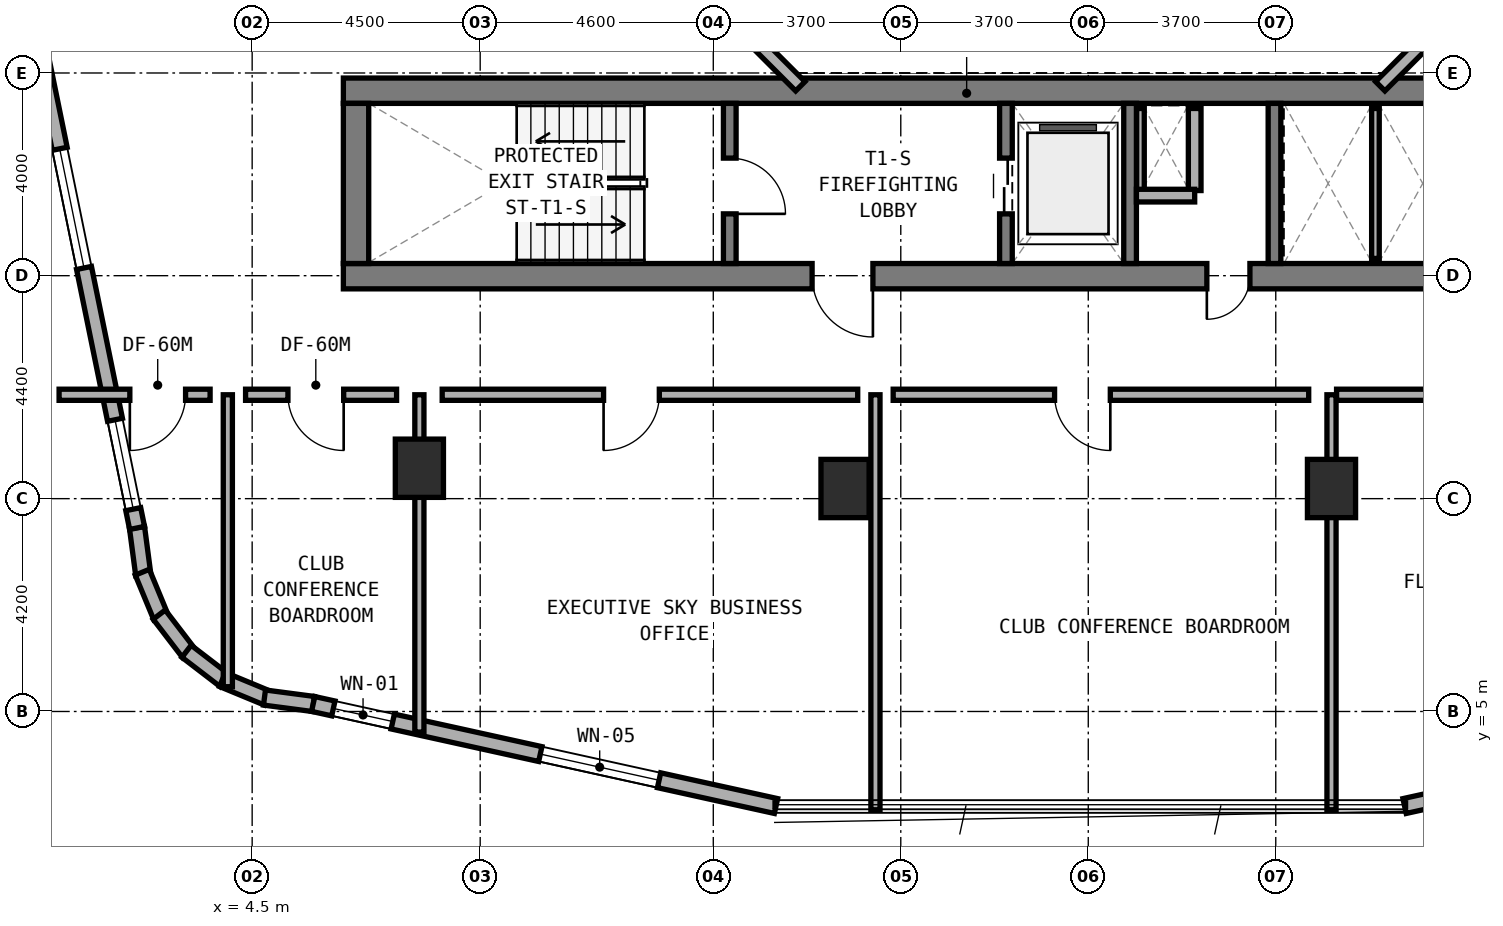
"""IFC4 building model, lengths in metres.
Left out: names, types, materials, properties, quantities, classifications, styles, units other than length and angle.
Written with IfcOpenShell. Run it as: python <this file> out.ifc"""

import sys

from ifc_helpers import new_model, si_unit, direction, frame, frame_2d, origin, origin_2d, place, context, subcontext, project, spatial, rectangle, extrude, element, fill, save


model = new_model("IFC4")
c1 = context("Model", 3, precision=1e-05, world=origin(), true_north=direction((0.0, 1.0)))
c2 = subcontext(c1, "Body", "Model", "MODEL_VIEW")
j1 = project(units=[si_unit("LENGTHUNIT", "METRE"), si_unit("PLANEANGLEUNIT", "RADIAN")], contexts=[c1])
p1 = place(None, origin())
s1 = spatial("IfcSite", under=j1, at=p1, CompositionType="ELEMENT")
p2 = place(p1, origin())
s2 = spatial("IfcBuilding", under=s1, at=p2, CompositionType="ELEMENT")
p3 = place(p2, frame((0.0, 0.0, 62.5)))
s3 = spatial("IfcBuildingStorey", under=s2, at=p3, CompositionType="ELEMENT", Elevation=62.5)
p4 = place(p3, frame((6.3, 13.59, 0.0), z_axis=(0.0, 0.0, 1.0), x_axis=(1.0, 0.0, 0.0)))
e1 = element("IfcWall", 1, at=p4, inside=s3, PredefinedType="SHEAR", context=c2, shape_type="SweptSolid", body=[
    extrude(rectangle(XDim=24.6, YDim=0.5, at=frame_2d((12.3, 0.0))), origin(), (0.0, 0.0, 1.0), 3.5),
])
p5 = place(p4, frame((9.25, 0.0, 0.0)))
e2 = element("IfcOpeningElement", 2, at=p5, cuts=e1, PredefinedType="OPENING", context=c2, shape_type="SweptSolid", body=[
    extrude(rectangle(XDim=1.2, YDim=2.15, at=frame_2d((0.6, 1.075))), frame((0.0, 0.26, 0.0), z_axis=(0.0, -1.0, 0.0), x_axis=(1.0, 0.0, 0.0)), (0.0, 0.0, 1.0), 0.52),
])
p6 = place(p4, frame((17.04, 0.0, 0.0)))
e3 = element("IfcOpeningElement", 3, at=p6, cuts=e1, PredefinedType="OPENING", context=c2, shape_type="SweptSolid", body=[
    extrude(rectangle(XDim=0.85, YDim=2.1, at=frame_2d((0.425, 1.05))), frame((0.0, 0.26, 0.0), z_axis=(0.0, -1.0, 0.0), x_axis=(1.0, 0.0, 0.0)), (0.0, 0.0, 1.0), 0.52),
])
p7 = place(p3, frame((6.3, 17.25, 0.0), z_axis=(0.0, 0.0, 1.0), x_axis=(1.0, 0.0, 0.0)))
e4 = element("IfcWall", 4, at=p7, inside=s3, PredefinedType="SHEAR", context=c2, shape_type="SweptSolid", body=[
    extrude(rectangle(XDim=24.6, YDim=0.5, at=frame_2d((12.3, 0.0))), origin(), (0.0, 0.0, 1.0), 3.5),
])
p8 = place(p3, frame((6.55, 13.84, 0.0), z_axis=(0.0, 0.0, 1.0), x_axis=(0.0, 1.0, 0.0)))
e5 = element("IfcWall", 5, at=p8, inside=s3, PredefinedType="SHEAR", context=c2, shape_type="SweptSolid", body=[
    extrude(rectangle(XDim=3.16, YDim=0.5, at=frame_2d((1.58, 0.0))), origin(), (0.0, 0.0, 1.0), 3.5),
])
p9 = place(p3, frame((13.925, 13.84, 0.0), z_axis=(0.0, 0.0, 1.0), x_axis=(0.0, 1.0, 0.0)))
e6 = element("IfcWall", 6, at=p9, inside=s3, PredefinedType="STANDARD", context=c2, shape_type="SweptSolid", body=[
    extrude(rectangle(XDim=3.16, YDim=0.25, at=frame_2d((1.58, 0.0))), origin(), (0.0, 0.0, 1.0), 3.22),
])
p10 = place(p9, frame((0.98, 0.0, 0.0)))
e7 = element("IfcOpeningElement", 7, at=p10, cuts=e6, PredefinedType="OPENING", context=c2, shape_type="SweptSolid", body=[
    extrude(rectangle(XDim=1.1, YDim=2.15, at=frame_2d((0.55, 1.075))), frame((0.0, 0.135, 0.0), z_axis=(0.0, -1.0, 0.0), x_axis=(1.0, 0.0, 0.0)), (0.0, 0.0, 1.0), 0.27),
])
p11 = place(p3, frame((19.375, 13.84, 0.0), z_axis=(0.0, 0.0, 1.0), x_axis=(0.0, 1.0, 0.0)))
e8 = element("IfcWall", 8, at=p11, inside=s3, PredefinedType="STANDARD", context=c2, shape_type="SweptSolid", body=[
    extrude(rectangle(XDim=3.16, YDim=0.25, at=frame_2d((1.58, 0.0))), origin(), (0.0, 0.0, 1.0), 3.22),
])
p12 = place(p11, frame((0.98, 0.0, 0.0)))
e9 = element("IfcOpeningElement", 9, at=p12, cuts=e8, PredefinedType="OPENING", context=c2, shape_type="SweptSolid", body=[
    extrude(rectangle(XDim=1.1, YDim=2.15, at=frame_2d((0.55, 1.075))), frame((0.0, 0.135, 0.0), z_axis=(0.0, -1.0, 0.0), x_axis=(1.0, 0.0, 0.0)), (0.0, 0.0, 1.0), 0.27),
])
for number, where, z_axis, x_axis in (
    (10, (21.825, 13.84, 0.0), (0.0, 0.0, 1.0), (0.0, 1.0, 0.0)),
    (11, (24.675, 13.84, 0.0), (0.0, 0.0, 1.0), (0.0, 1.0, 0.0)),
):
    element("IfcWall", number, at=place(p3, frame(where, z_axis=z_axis, x_axis=x_axis)), inside=s3, PredefinedType="STANDARD", context=c2, shape_type="SweptSolid", body=[
        extrude(rectangle(XDim=3.16, YDim=0.25, at=frame_2d((1.58, 0.0))), origin(), (0.0, 0.0, 1.0), 3.22),
    ])
for number, where, z_axis, x_axis in (
    (12, (16.2, 9.4, 0.0), (0.0, 0.0, 1.0), (1.0, 0.0, 0.0)),
    (13, (25.8, 9.4, 0.0), (0.0, 0.0, 1.0), (1.0, 0.0, 0.0)),
    (14, (7.8, 9.8, 0.0), (0.0, 0.0, 1.0), (1.0, 0.0, 0.0)),
):
    element("IfcColumn", number, at=place(p3, frame(where, z_axis=z_axis, x_axis=x_axis)), inside=s3, PredefinedType="COLUMN", context=c2, shape_type="SweptSolid", body=[
        extrude(rectangle(XDim=0.95, YDim=1.15, at=origin_2d()), origin(), (0.0, 0.0, 1.0), 3.5),
    ])
p13 = place(p3, frame((2.228, 8.628, 0.0), z_axis=(0.0, 0.0, 1.0), x_axis=(0.131174864804, -0.991359246108, 0.0)))
e15 = element("IfcWall", 15, at=p13, inside=s3, PredefinedType="STANDARD", context=c2, shape_type="SweptSolid", body=[
    extrude(rectangle(XDim=0.938, YDim=0.3, at=frame_2d((0.469, 0.0))), origin(), (0.0, 0.0, 1.0), 3.22),
])
p14 = place(p3, frame((2.332, 7.748, 0.0), z_axis=(0.0, 0.0, 1.0), x_axis=(0.382344263057, -0.924019948111, 0.0)))
e16 = element("IfcWall", 16, at=p14, inside=s3, PredefinedType="STANDARD", context=c2, shape_type="SweptSolid", body=[
    extrude(rectangle(XDim=0.955, YDim=0.3, at=frame_2d((0.477, 0.0))), origin(), (0.0, 0.0, 1.0), 3.22),
])
for number, where, z_axis, x_axis in (
    (17, (2.666, 6.911, 0.0), (0.0, 0.0, 1.0), (0.608, -0.794, 0.0)),
    (18, (3.205, 6.188, 0.0), (0.0, 0.0, 1.0), (0.794, -0.608, 0.0)),
):
    element("IfcWall", number, at=place(p3, frame(where, z_axis=z_axis, x_axis=x_axis)), inside=s3, PredefinedType="STANDARD", context=c2, shape_type="SweptSolid", body=[
        extrude(rectangle(XDim=0.955, YDim=0.3, at=frame_2d((0.478, 0.0))), origin(), (0.0, 0.0, 1.0), 3.22),
    ])
p15 = place(p3, frame((3.914, 5.631, 0.0), z_axis=(0.0, 0.0, 1.0), x_axis=(0.923982547689, -0.382434636986, 0.0)))
e19 = element("IfcWall", 19, at=p15, inside=s3, PredefinedType="STANDARD", context=c2, shape_type="SweptSolid", body=[
    extrude(rectangle(XDim=0.954, YDim=0.3, at=frame_2d((0.477, 0.0))), origin(), (0.0, 0.0, 1.0), 3.22),
])
p16 = place(p3, frame((4.743, 5.275, 0.0), z_axis=(0.0, 0.0, 1.0), x_axis=(0.99145856342, -0.130422072598, 0.0)))
e20 = element("IfcWall", 20, at=p16, inside=s3, PredefinedType="STANDARD", context=c2, shape_type="SweptSolid", body=[
    extrude(rectangle(XDim=0.973, YDim=0.3, at=frame_2d((0.487, 0.0))), origin(), (0.0, 0.0, 1.0), 3.22),
])
p17 = place(p3, frame((5.704, 5.148, 0.0), z_axis=(0.0, 0.0, 1.0), x_axis=(0.9765437942, -0.215318875183, 0.0)))
e21 = element("IfcWall", 21, at=p17, inside=s3, PredefinedType="STANDARD", context=c2, shape_type="SweptSolid", body=[
    extrude(rectangle(XDim=9.353, YDim=0.3, at=frame_2d((4.677, 0.0))), origin(), (0.0, 0.0, 1.0), 3.22),
])
p18 = place(p17, frame((0.408, 0.0, 0.85)))
e22 = element("IfcOpeningElement", 22, at=p18, cuts=e21, PredefinedType="OPENING", context=c2, shape_type="SweptSolid", body=[
    extrude(rectangle(XDim=1.2, YDim=1.5, at=frame_2d((0.6, 0.75))), frame((0.0, 0.16, 0.0), z_axis=(0.0, -1.0, 0.0), x_axis=(1.0, 0.0, 0.0)), (0.0, 0.0, 1.0), 0.32),
])
p19 = place(p17, frame((4.59, 0.0, 0.8)))
e23 = element("IfcOpeningElement", 23, at=p19, cuts=e21, PredefinedType="OPENING", context=c2, shape_type="SweptSolid", body=[
    extrude(rectangle(XDim=2.4, YDim=1.6, at=frame_2d((1.2, 0.8))), frame((0.0, 0.16, 0.0), z_axis=(0.0, -1.0, 0.0), x_axis=(1.0, 0.0, 0.0)), (0.0, 0.0, 1.0), 0.32),
])
p20 = place(p3, frame((27.242, 3.134, 0.0), z_axis=(0.0, 0.0, 1.0), x_axis=(0.97654500432, 0.215313386808, 0.0)))
e24 = element("IfcWall", 24, at=p20, inside=s3, PredefinedType="STANDARD", context=c2, shape_type="SweptSolid", body=[
    extrude(rectangle(XDim=9.354, YDim=0.3, at=frame_2d((4.677, 0.0))), origin(), (0.0, 0.0, 1.0), 3.22),
])
p21 = place(p20, frame((3.477, 0.0, 0.8)))
e25 = element("IfcOpeningElement", 25, at=p21, cuts=e24, PredefinedType="OPENING", context=c2, shape_type="SweptSolid", body=[
    extrude(rectangle(XDim=2.4, YDim=1.6, at=frame_2d((1.2, 0.8))), frame((0.0, 0.16, 0.0), z_axis=(0.0, -1.0, 0.0), x_axis=(1.0, 0.0, 0.0)), (0.0, 0.0, 1.0), 0.32),
])
p22 = place(p3, frame((0.216, 18.484, 0.0), z_axis=(0.0, 0.0, 1.0), x_axis=(0.199990901713, -0.979797754249, 0.0)))
e26 = element("IfcWall", 26, at=p22, inside=s3, PredefinedType="STANDARD", context=c2, shape_type="SweptSolid", body=[
    extrude(rectangle(XDim=10.065, YDim=0.3, at=frame_2d((5.033, 0.0))), origin(), (0.0, 0.0, 1.0), 3.22),
])
p23 = place(p22, frame((2.429, 0.0, 0.8)))
e27 = element("IfcOpeningElement", 27, at=p23, cuts=e26, PredefinedType="OPENING", context=c2, shape_type="SweptSolid", body=[
    extrude(rectangle(XDim=2.4, YDim=1.6, at=frame_2d((1.2, 0.8))), frame((0.0, 0.16, 0.0), z_axis=(0.0, -1.0, 0.0), x_axis=(1.0, 0.0, 0.0)), (0.0, 0.0, 1.0), 0.32),
])
p24 = place(p22, frame((7.887, 0.0, 0.85)))
e28 = element("IfcOpeningElement", 28, at=p24, cuts=e26, PredefinedType="OPENING", context=c2, shape_type="SweptSolid", body=[
    extrude(rectangle(XDim=1.8, YDim=1.5, at=frame_2d((0.9, 0.75))), frame((0.0, 0.16, 0.0), z_axis=(0.0, -1.0, 0.0), x_axis=(1.0, 0.0, 0.0)), (0.0, 0.0, 1.0), 0.32),
])
p25 = place(p3, frame((26.762, 17.338, 0.0), z_axis=(0.0, 0.0, 1.0), x_axis=(0.707059717605, 0.707153841636, 0.0)))
e29 = element("IfcWall", 29, at=p25, inside=s3, PredefinedType="STANDARD", context=c2, shape_type="SweptSolid", body=[
    extrude(rectangle(XDim=2.594, YDim=0.26, at=frame_2d((1.297, 0.0))), origin(), (0.0, 0.0, 1.0), 3.22),
])
p26 = place(p3, frame((13.484, 19.172, 0.0), z_axis=(0.0, 0.0, 1.0), x_axis=(0.707106781187, -0.707106781187, 0.0)))
e30 = element("IfcWall", 30, at=p26, inside=s3, PredefinedType="STANDARD", context=c2, shape_type="SweptSolid", body=[
    extrude(rectangle(XDim=2.594, YDim=0.26, at=frame_2d((1.297, 0.0))), origin(), (0.0, 0.0, 1.0), 3.22),
])
p27 = place(p3, frame((22.03, 15.28, 0.0), z_axis=(0.0, 0.0, 1.0), x_axis=(0.0, 1.0, 0.0)))
e31 = element("IfcWall", 31, at=p27, inside=s3, PredefinedType="PARTITIONING", context=c2, shape_type="SweptSolid", body=[
    extrude(rectangle(XDim=1.62, YDim=0.15, at=frame_2d((0.81, 0.0))), origin(), (0.0, 0.0, 1.0), 3.22),
])
p28 = place(p3, frame((23.1, 15.28, 0.0), z_axis=(0.0, 0.0, 1.0), x_axis=(0.0, 1.0, 0.0)))
e32 = element("IfcWall", 32, at=p28, inside=s3, PredefinedType="SOLIDWALL", context=c2, shape_type="SweptSolid", body=[
    extrude(rectangle(XDim=1.62, YDim=0.25, at=frame_2d((0.81, 0.0))), origin(), (0.0, 0.0, 1.0), 3.22),
])
p29 = place(p3, frame((21.95, 15.18, 0.0), z_axis=(0.0, 0.0, 1.0), x_axis=(1.0, 0.0, 0.0)))
e33 = element("IfcWall", 33, at=p29, inside=s3, PredefinedType="SOLIDWALL", context=c2, shape_type="SweptSolid", body=[
    extrude(rectangle(XDim=1.15, YDim=0.25, at=frame_2d((0.575, 0.0))), origin(), (0.0, 0.0, 1.0), 3.22),
])
p30 = place(p3, frame((26.667, 13.94, 0.0), z_axis=(0.0, 0.0, 1.0), x_axis=(0.0, 1.0, 0.0)))
e34 = element("IfcWall", 34, at=p30, inside=s3, PredefinedType="PARTITIONING", context=c2, shape_type="SweptSolid", body=[
    extrude(rectangle(XDim=2.96, YDim=0.15, at=frame_2d((1.48, 0.0))), origin(), (0.0, 0.0, 1.0), 3.22),
])
p31 = place(p3, frame((4.02, 5.489, 0.0), z_axis=(0.0, 0.0, 1.0), x_axis=(0.0, 1.0, 0.0)))
e35 = element("IfcWall", 35, at=p31, inside=s3, PredefinedType="SOLIDWALL", context=c2, shape_type="SweptSolid", body=[
    extrude(rectangle(XDim=5.761, YDim=0.18, at=frame_2d((2.88, 0.0))), origin(), (0.0, 0.0, 1.0), 3.22),
])
p32 = place(p3, frame((0.69, 11.25, 0.0), z_axis=(0.0, 0.0, 1.0), x_axis=(1.0, 0.0, 0.0)))
e36 = element("IfcWall", 36, at=p32, inside=s3, PredefinedType="SOLIDWALL", context=c2, shape_type="SweptSolid", body=[
    extrude(rectangle(XDim=2.98, YDim=0.22, at=frame_2d((1.49, 0.0))), origin(), (0.0, 0.0, 1.0), 3.22),
])
p33 = place(p32, frame((1.396, 0.0, 0.0)))
e37 = element("IfcOpeningElement", 37, at=p33, cuts=e36, PredefinedType="OPENING", context=c2, shape_type="SweptSolid", body=[
    extrude(rectangle(XDim=1.1, YDim=2.1, at=frame_2d((0.55, 1.05))), frame((0.0, 0.12, 0.0), z_axis=(0.0, -1.0, 0.0), x_axis=(1.0, 0.0, 0.0)), (0.0, 0.0, 1.0), 0.24),
])
p34 = place(p3, frame((4.37, 11.25, 0.0), z_axis=(0.0, 0.0, 1.0), x_axis=(1.0, 0.0, 0.0)))
e38 = element("IfcWall", 38, at=p34, inside=s3, PredefinedType="SOLIDWALL", context=c2, shape_type="SweptSolid", body=[
    extrude(rectangle(XDim=2.98, YDim=0.22, at=frame_2d((1.49, 0.0))), origin(), (0.0, 0.0, 1.0), 3.22),
])
p35 = place(p34, frame((0.836, 0.0, 0.0)))
e39 = element("IfcOpeningElement", 39, at=p35, cuts=e38, PredefinedType="OPENING", context=c2, shape_type="SweptSolid", body=[
    extrude(rectangle(XDim=1.1, YDim=2.1, at=frame_2d((0.55, 1.05))), frame((0.0, 0.12, 0.0), z_axis=(0.0, -1.0, 0.0), x_axis=(1.0, 0.0, 0.0)), (0.0, 0.0, 1.0), 0.24),
])
p36 = place(p3, frame((7.8, 4.594, 0.0), z_axis=(0.0, 0.0, 1.0), x_axis=(0.0, 1.0, 0.0)))
e40 = element("IfcWall", 40, at=p36, inside=s3, PredefinedType="SOLIDWALL", context=c2, shape_type="SweptSolid", body=[
    extrude(rectangle(XDim=6.656, YDim=0.18, at=frame_2d((3.328, 0.0))), origin(), (0.0, 0.0, 1.0), 2.495),
])
p37 = place(p3, frame((16.8, 3.06, 0.0), z_axis=(0.0, 0.0, 1.0), x_axis=(0.0, 1.0, 0.0)))
e41 = element("IfcWall", 41, at=p37, inside=s3, PredefinedType="SOLIDWALL", context=c2, shape_type="SweptSolid", body=[
    extrude(rectangle(XDim=8.19, YDim=0.18, at=frame_2d((4.095, 0.0))), origin(), (0.0, 0.0, 1.0), 2.745),
])
p38 = place(p3, frame((8.25, 11.25, 0.0), z_axis=(0.0, 0.0, 1.0), x_axis=(1.0, 0.0, 0.0)))
e42 = element("IfcWall", 42, at=p38, inside=s3, PredefinedType="SOLIDWALL", context=c2, shape_type="SweptSolid", body=[
    extrude(rectangle(XDim=8.2, YDim=0.22, at=frame_2d((4.1, 0.0))), origin(), (0.0, 0.0, 1.0), 2.495),
])
p39 = place(p38, frame((3.185, 0.0, 0.0)))
e43 = element("IfcOpeningElement", 43, at=p39, cuts=e42, PredefinedType="OPENING", context=c2, shape_type="SweptSolid", body=[
    extrude(rectangle(XDim=1.1, YDim=2.1, at=frame_2d((0.55, 1.05))), frame((0.0, 0.12, 0.0), z_axis=(0.0, -1.0, 0.0), x_axis=(1.0, 0.0, 0.0)), (0.0, 0.0, 1.0), 0.24),
])
p40 = place(p3, frame((17.15, 11.25, 0.0), z_axis=(0.0, 0.0, 1.0), x_axis=(1.0, 0.0, 0.0)))
e44 = element("IfcWall", 44, at=p40, inside=s3, PredefinedType="SOLIDWALL", context=c2, shape_type="SweptSolid", body=[
    extrude(rectangle(XDim=8.2, YDim=0.22, at=frame_2d((4.1, 0.0))), origin(), (0.0, 0.0, 1.0), 2.865),
])
p41 = place(p40, frame((3.185, 0.0, 0.0)))
e45 = element("IfcOpeningElement", 45, at=p41, cuts=e44, PredefinedType="OPENING", context=c2, shape_type="SweptSolid", body=[
    extrude(rectangle(XDim=1.1, YDim=2.1, at=frame_2d((0.55, 1.05))), frame((0.0, 0.12, 0.0), z_axis=(0.0, -1.0, 0.0), x_axis=(1.0, 0.0, 0.0)), (0.0, 0.0, 1.0), 0.24),
])
p42 = place(p3, frame((25.8, 3.06, 0.0), z_axis=(0.0, 0.0, 1.0), x_axis=(0.0, 1.0, 0.0)))
e46 = element("IfcWall", 46, at=p42, inside=s3, PredefinedType="SOLIDWALL", context=c2, shape_type="SweptSolid", body=[
    extrude(rectangle(XDim=8.19, YDim=0.18, at=frame_2d((4.095, 0.0))), origin(), (0.0, 0.0, 1.0), 2.495),
])
p43 = place(p3, frame((25.9, 11.25, 0.0), z_axis=(0.0, 0.0, 1.0), x_axis=(1.0, 0.0, 0.0)))
e47 = element("IfcWall", 47, at=p43, inside=s3, PredefinedType="SOLIDWALL", context=c2, shape_type="SweptSolid", body=[
    extrude(rectangle(XDim=15.84, YDim=0.22, at=frame_2d((7.92, 0.0))), origin(), (0.0, 0.0, 1.0), 2.495),
])
p44 = place(p43, frame((6.691, 0.0, 0.0)))
e48 = element("IfcOpeningElement", 48, at=p44, cuts=e47, PredefinedType="OPENING", context=c2, shape_type="SweptSolid", body=[
    extrude(rectangle(XDim=0.95, YDim=2.1, at=frame_2d((0.475, 1.05))), frame((0.0, 0.12, 0.0), z_axis=(0.0, -1.0, 0.0), x_axis=(1.0, 0.0, 0.0)), (0.0, 0.0, 1.0), 0.24),
])
p45 = place(p18, origin())
e49 = element("IfcWindow", 49, at=p45, inside=s3, PartitioningType="SINGLE_PANEL", PredefinedType="WINDOW", context=c2, shape_type="SweptSolid", body=[
    extrude(rectangle(XDim=1.2, YDim=1.5, at=frame_2d((0.6, 0.75))), frame((0.0, 0.03, 0.0), z_axis=(0.0, -1.0, 0.0), x_axis=(1.0, 0.0, 0.0)), (0.0, 0.0, 1.0), 0.06),
])
fill(e22, e49)
p46 = place(p19, origin())
e50 = element("IfcWindow", 50, at=p46, inside=s3, PartitioningType="SINGLE_PANEL", PredefinedType="WINDOW", context=c2, shape_type="SweptSolid", body=[
    extrude(rectangle(XDim=2.4, YDim=1.6, at=frame_2d((1.2, 0.8))), frame((0.0, 0.03, 0.0), z_axis=(0.0, -1.0, 0.0), x_axis=(1.0, 0.0, 0.0)), (0.0, 0.0, 1.0), 0.06),
])
fill(e23, e50)
p47 = place(p23, origin())
e51 = element("IfcWindow", 51, at=p47, inside=s3, PartitioningType="SINGLE_PANEL", PredefinedType="WINDOW", context=c2, shape_type="SweptSolid", body=[
    extrude(rectangle(XDim=2.4, YDim=1.6, at=frame_2d((1.2, 0.8))), frame((0.0, 0.03, 0.0), z_axis=(0.0, -1.0, 0.0), x_axis=(1.0, 0.0, 0.0)), (0.0, 0.0, 1.0), 0.06),
])
fill(e27, e51)
p48 = place(p24, origin())
e52 = element("IfcWindow", 52, at=p48, inside=s3, PartitioningType="SINGLE_PANEL", PredefinedType="WINDOW", context=c2, shape_type="SweptSolid", body=[
    extrude(rectangle(XDim=1.8, YDim=1.5, at=frame_2d((0.9, 0.75))), frame((0.0, 0.03, 0.0), z_axis=(0.0, -1.0, 0.0), x_axis=(1.0, 0.0, 0.0)), (0.0, 0.0, 1.0), 0.06),
])
fill(e28, e52)
p49 = place(p10, frame((1.1, 0.0, 0.0), z_axis=(0.0, 0.0, 1.0), x_axis=(-1.0, 0.0, 0.0)))
e53 = element("IfcDoor", 53, at=p49, inside=s3, OperationType="SINGLE_SWING_RIGHT", PredefinedType="DOOR", context=c2, shape_type="SweptSolid", body=[
    extrude(rectangle(XDim=1.1, YDim=2.15, at=frame_2d((0.55, 1.075))), frame((0.0, 0.025, 0.0), z_axis=(0.0, -1.0, 0.0), x_axis=(1.0, 0.0, 0.0)), (0.0, 0.0, 1.0), 0.05),
])
fill(e7, e53)
p50 = place(p5, frame((1.2, 0.0, 0.0), z_axis=(0.0, 0.0, 1.0), x_axis=(-1.0, 0.0, 0.0)))
e54 = element("IfcDoor", 54, at=p50, inside=s3, OperationType="SINGLE_SWING_LEFT", PredefinedType="DOOR", context=c2, shape_type="SweptSolid", body=[
    extrude(rectangle(XDim=1.2, YDim=2.15, at=frame_2d((0.6, 1.075))), frame((0.0, 0.025, 0.0), z_axis=(0.0, -1.0, 0.0), x_axis=(1.0, 0.0, 0.0)), (0.0, 0.0, 1.0), 0.05),
])
fill(e2, e54)
p51 = place(p12, origin())
e55 = element("IfcDoor", 55, at=p51, inside=s3, OperationType="DOUBLE_DOOR_SLIDING", PredefinedType="DOOR", context=c2, shape_type="SweptSolid", body=[
    extrude(rectangle(XDim=1.1, YDim=2.15, at=frame_2d((0.55, 1.075))), frame((0.0, 0.025, 0.0), z_axis=(0.0, -1.0, 0.0), x_axis=(1.0, 0.0, 0.0)), (0.0, 0.0, 1.0), 0.05),
])
fill(e9, e55)
p52 = place(p6, frame((0.85, 0.0, 0.0), z_axis=(0.0, 0.0, 1.0), x_axis=(-1.0, 0.0, 0.0)))
e56 = element("IfcDoor", 56, at=p52, inside=s3, OperationType="SINGLE_SWING_RIGHT", PredefinedType="DOOR", context=c2, shape_type="SweptSolid", body=[
    extrude(rectangle(XDim=0.85, YDim=2.1, at=frame_2d((0.425, 1.05))), frame((0.0, 0.025, 0.0), z_axis=(0.0, -1.0, 0.0), x_axis=(1.0, 0.0, 0.0)), (0.0, 0.0, 1.0), 0.05),
])
fill(e3, e56)
p53 = place(p33, frame((1.1, 0.0, 0.0), z_axis=(0.0, 0.0, 1.0), x_axis=(-1.0, 0.0, 0.0)))
e57 = element("IfcDoor", 57, at=p53, inside=s3, OperationType="SINGLE_SWING_RIGHT", PredefinedType="DOOR", context=c2, shape_type="SweptSolid", body=[
    extrude(rectangle(XDim=1.1, YDim=2.1, at=frame_2d((0.55, 1.05))), frame((0.0, 0.025, 0.0), z_axis=(0.0, -1.0, 0.0), x_axis=(1.0, 0.0, 0.0)), (0.0, 0.0, 1.0), 0.05),
])
fill(e37, e57)
p54 = place(p35, frame((1.1, 0.0, 0.0), z_axis=(0.0, 0.0, 1.0), x_axis=(-1.0, 0.0, 0.0)))
e58 = element("IfcDoor", 58, at=p54, inside=s3, OperationType="SINGLE_SWING_LEFT", PredefinedType="DOOR", context=c2, shape_type="SweptSolid", body=[
    extrude(rectangle(XDim=1.1, YDim=2.1, at=frame_2d((0.55, 1.05))), frame((0.0, 0.025, 0.0), z_axis=(0.0, -1.0, 0.0), x_axis=(1.0, 0.0, 0.0)), (0.0, 0.0, 1.0), 0.05),
])
fill(e39, e58)
p55 = place(p39, frame((1.1, 0.0, 0.0), z_axis=(0.0, 0.0, 1.0), x_axis=(-1.0, 0.0, 0.0)))
e59 = element("IfcDoor", 59, at=p55, inside=s3, OperationType="SINGLE_SWING_RIGHT", PredefinedType="DOOR", context=c2, shape_type="SweptSolid", body=[
    extrude(rectangle(XDim=1.1, YDim=2.1, at=frame_2d((0.55, 1.05))), frame((0.0, 0.025, 0.0), z_axis=(0.0, -1.0, 0.0), x_axis=(1.0, 0.0, 0.0)), (0.0, 0.0, 1.0), 0.05),
])
fill(e43, e59)
p56 = place(p41, frame((1.1, 0.0, 0.0), z_axis=(0.0, 0.0, 1.0), x_axis=(-1.0, 0.0, 0.0)))
e60 = element("IfcDoor", 60, at=p56, inside=s3, OperationType="SINGLE_SWING_LEFT", PredefinedType="DOOR", context=c2, shape_type="SweptSolid", body=[
    extrude(rectangle(XDim=1.1, YDim=2.1, at=frame_2d((0.55, 1.05))), frame((0.0, 0.025, 0.0), z_axis=(0.0, -1.0, 0.0), x_axis=(1.0, 0.0, 0.0)), (0.0, 0.0, 1.0), 0.05),
])
fill(e45, e60)
save(model, sys.argv[1])
